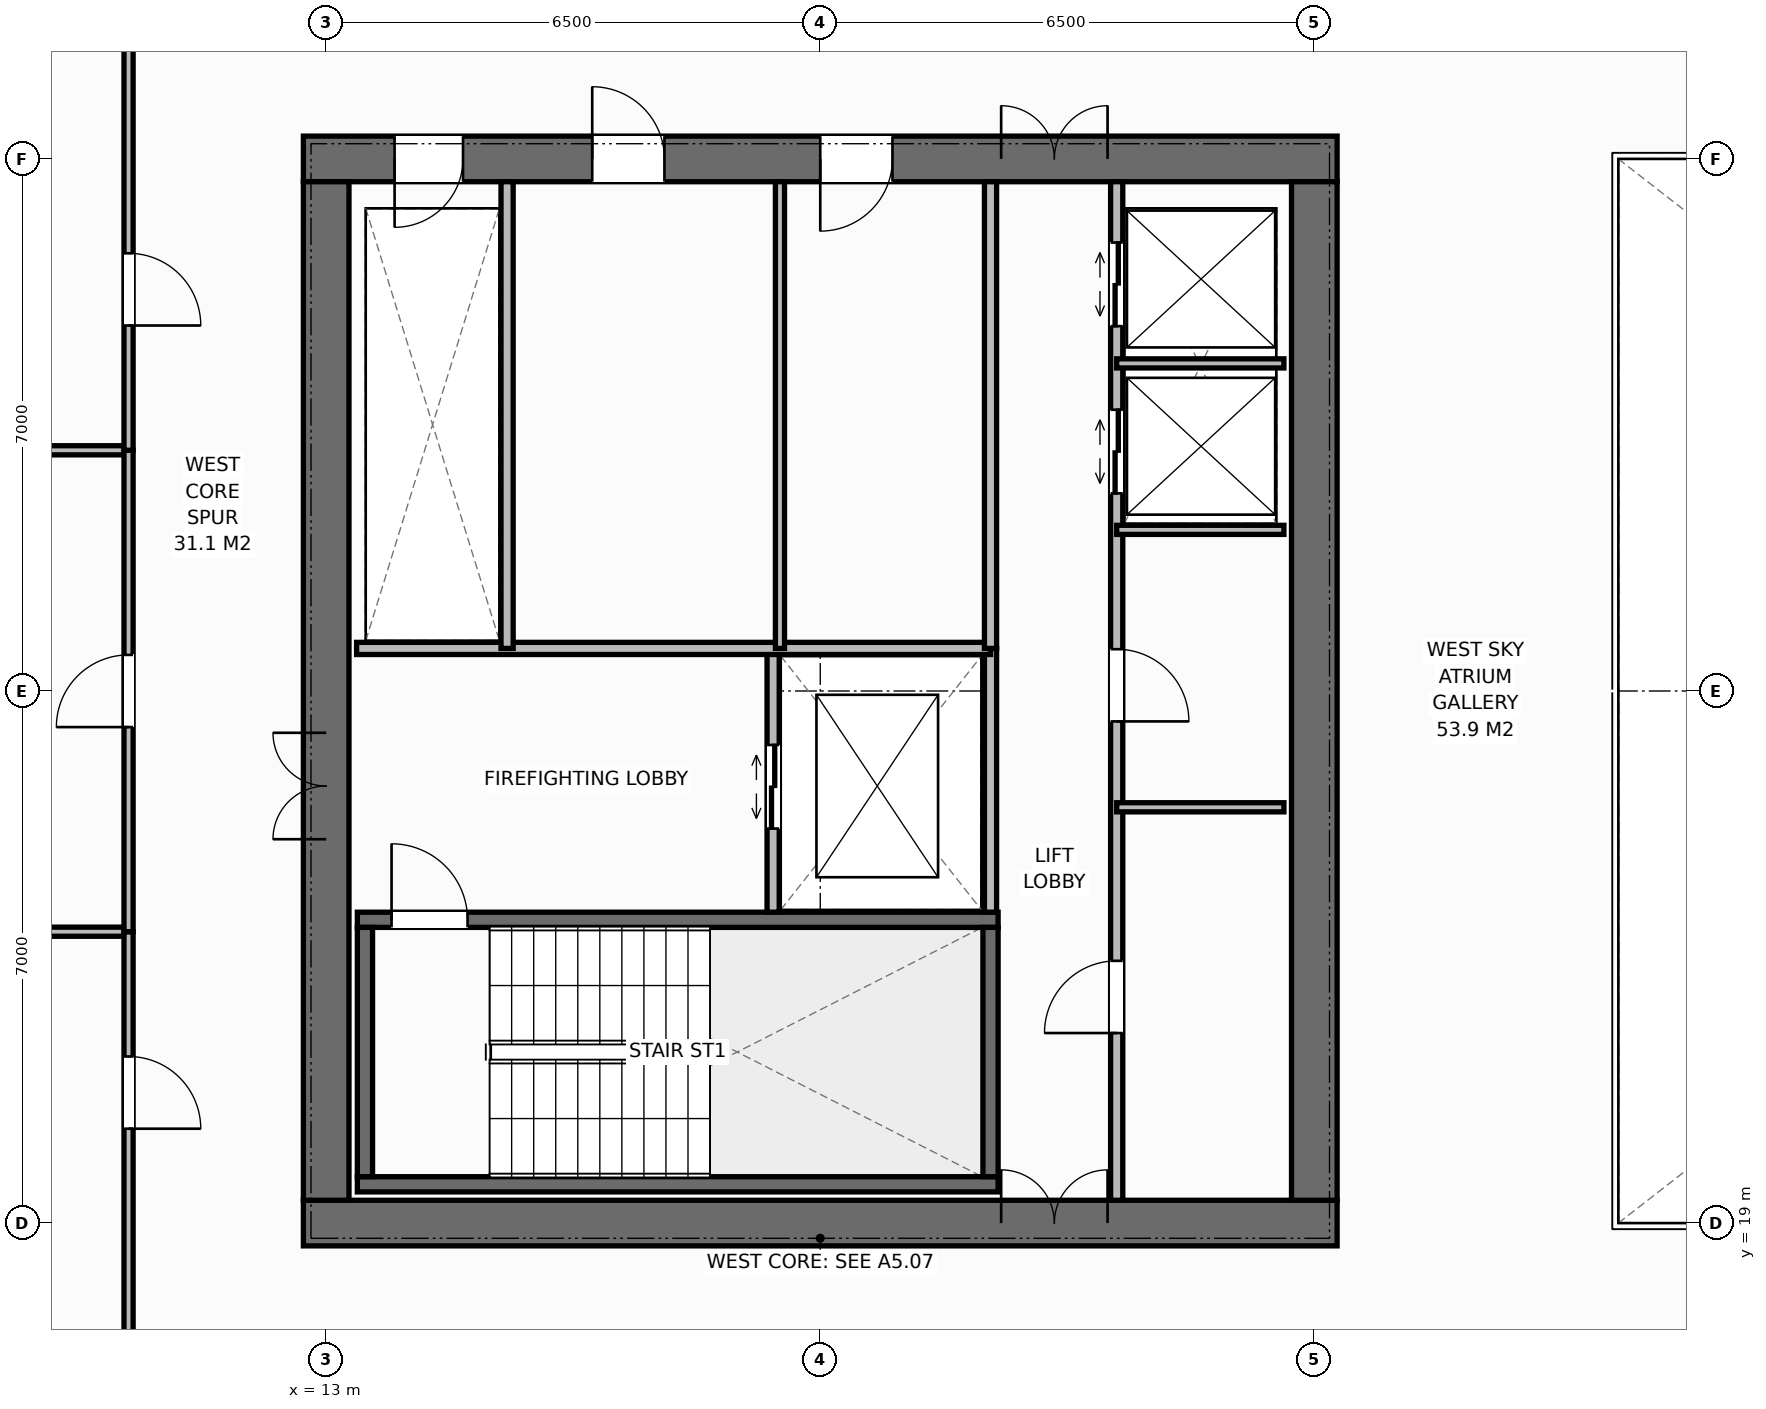
"""IFC4 building model, lengths in metres.
Left out: names, types, materials, properties, quantities, classifications, styles, units other than length and angle.
Written with IfcOpenShell. Run it as: python <this file> out.ifc"""

import sys

from ifc_helpers import new_model, si_unit, direction, frame, frame_2d, origin, place, context, subcontext, project, spatial, rectangle, extrude, element, fill, save


model = new_model("IFC4")
c1 = context("Model", 3, precision=1e-05, world=origin(), true_north=direction((0.0, 1.0)))
c2 = subcontext(c1, "Body", "Model", "MODEL_VIEW")
j1 = project(units=[si_unit("LENGTHUNIT", "METRE"), si_unit("PLANEANGLEUNIT", "RADIAN")], contexts=[c1])
p1 = place(None, origin())
s1 = spatial("IfcSite", under=j1, at=p1, CompositionType="ELEMENT")
p2 = place(p1, origin())
s2 = spatial("IfcBuilding", under=s1, at=p2, CompositionType="ELEMENT")
p3 = place(p2, frame((0.0, 0.0, 189.8)))
s3 = spatial("IfcBuildingStorey", under=s2, at=p3, CompositionType="ELEMENT", Elevation=189.8)
p4 = place(p3, frame((12.7, 19.0, 0.0), z_axis=(0.0, 0.0, 1.0), x_axis=(1.0, 0.0, 0.0)))
e1 = element("IfcWall", 1, at=p4, inside=s3, PredefinedType="SHEAR", context=c2, shape_type="SweptSolid", body=[
    extrude(rectangle(XDim=13.6, YDim=0.6, at=frame_2d((6.8, 0.0))), origin(), (0.0, 0.0, 1.0), 3.8),
])
p5 = place(p4, frame((9.18, 0.0, 0.0)))
e2 = element("IfcOpeningElement", 2, at=p5, cuts=e1, PredefinedType="OPENING", context=c2, shape_type="SweptSolid", body=[
    extrude(rectangle(XDim=1.4, YDim=2.2, at=frame_2d((0.7, 1.1))), frame((0.0, 0.31, 0.0), z_axis=(0.0, -1.0, 0.0), x_axis=(1.0, 0.0, 0.0)), (0.0, 0.0, 1.0), 0.62),
])
p6 = place(p3, frame((12.7, 33.0, 0.0), z_axis=(0.0, 0.0, 1.0), x_axis=(1.0, 0.0, 0.0)))
e3 = element("IfcWall", 3, at=p6, inside=s3, PredefinedType="SHEAR", context=c2, shape_type="SweptSolid", body=[
    extrude(rectangle(XDim=13.6, YDim=0.6, at=frame_2d((6.8, 0.0))), origin(), (0.0, 0.0, 1.0), 3.8),
])
p7 = place(p6, frame((1.2, 0.0, 0.0)))
e4 = element("IfcOpeningElement", 4, at=p7, cuts=e3, PredefinedType="OPENING", context=c2, shape_type="SweptSolid", body=[
    extrude(rectangle(XDim=0.9, YDim=2.15, at=frame_2d((0.45, 1.075))), frame((0.0, 0.31, 0.0), z_axis=(0.0, -1.0, 0.0), x_axis=(1.0, 0.0, 0.0)), (0.0, 0.0, 1.0), 0.62),
])
p8 = place(p6, frame((3.8, 0.0, 0.0)))
e5 = element("IfcOpeningElement", 5, at=p8, cuts=e3, PredefinedType="OPENING", context=c2, shape_type="SweptSolid", body=[
    extrude(rectangle(XDim=0.95, YDim=2.15, at=frame_2d((0.475, 1.075))), frame((0.0, 0.31, 0.0), z_axis=(0.0, -1.0, 0.0), x_axis=(1.0, 0.0, 0.0)), (0.0, 0.0, 1.0), 0.62),
])
p9 = place(p6, frame((6.8, 0.0, 0.0)))
e6 = element("IfcOpeningElement", 6, at=p9, cuts=e3, PredefinedType="OPENING", context=c2, shape_type="SweptSolid", body=[
    extrude(rectangle(XDim=0.95, YDim=2.15, at=frame_2d((0.475, 1.075))), frame((0.0, 0.31, 0.0), z_axis=(0.0, -1.0, 0.0), x_axis=(1.0, 0.0, 0.0)), (0.0, 0.0, 1.0), 0.62),
])
p10 = place(p6, frame((9.18, 0.0, 0.0)))
e7 = element("IfcOpeningElement", 7, at=p10, cuts=e3, PredefinedType="OPENING", context=c2, shape_type="SweptSolid", body=[
    extrude(rectangle(XDim=1.4, YDim=2.2, at=frame_2d((0.7, 1.1))), frame((0.0, 0.31, 0.0), z_axis=(0.0, -1.0, 0.0), x_axis=(1.0, 0.0, 0.0)), (0.0, 0.0, 1.0), 0.62),
])
p11 = place(p3, frame((13.0, 19.3, 0.0), z_axis=(0.0, 0.0, 1.0), x_axis=(0.0, 1.0, 0.0)))
e8 = element("IfcWall", 8, at=p11, inside=s3, PredefinedType="SHEAR", context=c2, shape_type="SweptSolid", body=[
    extrude(rectangle(XDim=13.4, YDim=0.6, at=frame_2d((6.7, 0.0))), origin(), (0.0, 0.0, 1.0), 3.8),
])
p12 = place(p11, frame((4.75, 0.0, 0.0)))
e9 = element("IfcOpeningElement", 9, at=p12, cuts=e8, PredefinedType="OPENING", context=c2, shape_type="SweptSolid", body=[
    extrude(rectangle(XDim=1.4, YDim=2.2, at=frame_2d((0.7, 1.1))), frame((0.0, 0.31, 0.0), z_axis=(0.0, -1.0, 0.0), x_axis=(1.0, 0.0, 0.0)), (0.0, 0.0, 1.0), 0.62),
])
p13 = place(p3, frame((26.0, 19.3, 0.0), z_axis=(0.0, 0.0, 1.0), x_axis=(0.0, 1.0, 0.0)))
e10 = element("IfcWall", 10, at=p13, inside=s3, PredefinedType="SHEAR", context=c2, shape_type="SweptSolid", body=[
    extrude(rectangle(XDim=13.4, YDim=0.6, at=frame_2d((6.7, 0.0))), origin(), (0.0, 0.0, 1.0), 3.8),
])
p14 = place(p3, frame((13.41, 19.51, 0.0), z_axis=(0.0, 0.0, 1.0), x_axis=(1.0, 0.0, 0.0)))
e11 = element("IfcWall", 11, at=p14, inside=s3, PredefinedType="SHEAR", context=c2, shape_type="SweptSolid", body=[
    extrude(rectangle(XDim=8.43, YDim=0.2, at=frame_2d((4.215, 0.0))), origin(), (0.0, 0.0, 1.0), 3.8),
])
p15 = place(p3, frame((13.41, 22.99, 0.0), z_axis=(0.0, 0.0, 1.0), x_axis=(1.0, 0.0, 0.0)))
e12 = element("IfcWall", 12, at=p15, inside=s3, PredefinedType="SHEAR", context=c2, shape_type="SweptSolid", body=[
    extrude(rectangle(XDim=8.43, YDim=0.2, at=frame_2d((4.215, 0.0))), origin(), (0.0, 0.0, 1.0), 3.8),
])
p16 = place(p15, frame((0.45, 0.0, 0.0)))
e13 = element("IfcOpeningElement", 13, at=p16, cuts=e12, PredefinedType="OPENING", context=c2, shape_type="SweptSolid", body=[
    extrude(rectangle(XDim=1.0, YDim=2.15, at=frame_2d((0.5, 1.075))), frame((0.0, 0.11, 0.0), z_axis=(0.0, -1.0, 0.0), x_axis=(1.0, 0.0, 0.0)), (0.0, 0.0, 1.0), 0.22),
])
for number, where, z_axis, x_axis in (
    (14, (13.51, 19.61, 0.0), (0.0, 0.0, 1.0), (0.0, 1.0, 0.0)),
    (15, (21.74, 19.61, 0.0), (0.0, 0.0, 1.0), (0.0, 1.0, 0.0)),
):
    element("IfcWall", number, at=place(p3, frame(where, z_axis=z_axis, x_axis=x_axis)), inside=s3, PredefinedType="SHEAR", context=c2, shape_type="SweptSolid", body=[
        extrude(rectangle(XDim=3.28, YDim=0.2, at=frame_2d((1.64, 0.0))), origin(), (0.0, 0.0, 1.0), 3.8),
    ])
p17 = place(p3, frame((21.74, 23.09, 0.0), z_axis=(0.0, 0.0, 1.0), x_axis=(0.0, 1.0, 0.0)))
e16 = element("IfcWall", 16, at=p17, inside=s3, PredefinedType="STANDARD", context=c2, shape_type="SweptSolid", body=[
    extrude(rectangle(XDim=3.47, YDim=0.16, at=frame_2d((1.735, 0.0))), origin(), (0.0, 0.0, 1.0), 3.572),
])
p18 = place(p3, frame((18.88, 23.09, 0.0), z_axis=(0.0, 0.0, 1.0), x_axis=(0.0, 1.0, 0.0)))
e17 = element("IfcWall", 17, at=p18, inside=s3, PredefinedType="STANDARD", context=c2, shape_type="SweptSolid", body=[
    extrude(rectangle(XDim=3.47, YDim=0.16, at=frame_2d((1.735, 0.0))), origin(), (0.0, 0.0, 1.0), 3.572),
])
p19 = place(p18, frame((1.1, 0.0, 0.0)))
e18 = element("IfcOpeningElement", 18, at=p19, cuts=e17, PredefinedType="OPENING", context=c2, shape_type="SweptSolid", body=[
    extrude(rectangle(XDim=1.1, YDim=2.2, at=frame_2d((0.55, 1.1))), frame((0.0, 0.09, 0.0), z_axis=(0.0, -1.0, 0.0), x_axis=(1.0, 0.0, 0.0)), (0.0, 0.0, 1.0), 0.18),
])
p20 = place(p3, frame((13.4, 26.56, 0.0), z_axis=(0.0, 0.0, 1.0), x_axis=(1.0, 0.0, 0.0)))
e19 = element("IfcWall", 19, at=p20, inside=s3, PredefinedType="STANDARD", context=c2, shape_type="SweptSolid", body=[
    extrude(rectangle(XDim=8.34, YDim=0.16, at=frame_2d((4.17, 0.0))), origin(), (0.0, 0.0, 1.0), 3.572),
])
p21 = place(p3, frame((15.38, 26.56, 0.0), z_axis=(0.0, 0.0, 1.0), x_axis=(0.0, 1.0, 0.0)))
e20 = element("IfcWall", 20, at=p21, inside=s3, PredefinedType="STANDARD", context=c2, shape_type="SweptSolid", body=[
    extrude(rectangle(XDim=6.14, YDim=0.16, at=frame_2d((3.07, 0.0))), origin(), (0.0, 0.0, 1.0), 3.572),
])
p22 = place(p3, frame((18.97, 26.56, 0.0), z_axis=(0.0, 0.0, 1.0), x_axis=(0.0, 1.0, 0.0)))
e21 = element("IfcWall", 21, at=p22, inside=s3, PredefinedType="PARTITIONING", context=c2, shape_type="SweptSolid", body=[
    extrude(rectangle(XDim=6.14, YDim=0.12, at=frame_2d((3.07, 0.0))), origin(), (0.0, 0.0, 1.0), 3.572),
])
p23 = place(p3, frame((21.74, 26.56, 0.0), z_axis=(0.0, 0.0, 1.0), x_axis=(0.0, 1.0, 0.0)))
e22 = element("IfcWall", 22, at=p23, inside=s3, PredefinedType="STANDARD", context=c2, shape_type="SweptSolid", body=[
    extrude(rectangle(XDim=6.14, YDim=0.16, at=frame_2d((3.07, 0.0))), origin(), (0.0, 0.0, 1.0), 3.572),
])
p24 = place(p3, frame((23.4, 19.3, 0.0), z_axis=(0.0, 0.0, 1.0), x_axis=(0.0, 1.0, 0.0)))
e23 = element("IfcWall", 23, at=p24, inside=s3, PredefinedType="STANDARD", context=c2, shape_type="SweptSolid", body=[
    extrude(rectangle(XDim=13.4, YDim=0.16, at=frame_2d((6.7, 0.0))), origin(), (0.0, 0.0, 1.0), 3.572),
])
p25 = place(p24, frame((2.2, 0.0, 0.0)))
e24 = element("IfcOpeningElement", 24, at=p25, cuts=e23, PredefinedType="OPENING", context=c2, shape_type="SweptSolid", body=[
    extrude(rectangle(XDim=0.95, YDim=2.15, at=frame_2d((0.475, 1.075))), frame((0.0, 0.09, 0.0), z_axis=(0.0, -1.0, 0.0), x_axis=(1.0, 0.0, 0.0)), (0.0, 0.0, 1.0), 0.18),
])
p26 = place(p24, frame((6.3, 0.0, 0.0)))
e25 = element("IfcOpeningElement", 25, at=p26, cuts=e23, PredefinedType="OPENING", context=c2, shape_type="SweptSolid", body=[
    extrude(rectangle(XDim=0.95, YDim=2.15, at=frame_2d((0.475, 1.075))), frame((0.0, 0.09, 0.0), z_axis=(0.0, -1.0, 0.0), x_axis=(1.0, 0.0, 0.0)), (0.0, 0.0, 1.0), 0.18),
])
p27 = place(p24, frame((9.3, 0.0, 0.0)))
e26 = element("IfcOpeningElement", 26, at=p27, cuts=e23, PredefinedType="OPENING", context=c2, shape_type="SweptSolid", body=[
    extrude(rectangle(XDim=1.1, YDim=2.2, at=frame_2d((0.55, 1.1))), frame((0.0, 0.09, 0.0), z_axis=(0.0, -1.0, 0.0), x_axis=(1.0, 0.0, 0.0)), (0.0, 0.0, 1.0), 0.18),
])
p28 = place(p24, frame((11.5, 0.0, 0.0)))
e27 = element("IfcOpeningElement", 27, at=p28, cuts=e23, PredefinedType="OPENING", context=c2, shape_type="SweptSolid", body=[
    extrude(rectangle(XDim=1.1, YDim=2.2, at=frame_2d((0.55, 1.1))), frame((0.0, 0.09, 0.0), z_axis=(0.0, -1.0, 0.0), x_axis=(1.0, 0.0, 0.0)), (0.0, 0.0, 1.0), 0.18),
])
for number, where, z_axis, x_axis in (
    (28, (23.4, 24.47, 0.0), (0.0, 0.0, 1.0), (1.0, 0.0, 0.0)),
    (29, (23.4, 28.12, 0.0), (0.0, 0.0, 1.0), (1.0, 0.0, 0.0)),
    (30, (23.4, 30.31, 0.0), (0.0, 0.0, 1.0), (1.0, 0.0, 0.0)),
):
    element("IfcWall", number, at=place(p3, frame(where, z_axis=z_axis, x_axis=x_axis)), inside=s3, PredefinedType="PARTITIONING", context=c2, shape_type="SweptSolid", body=[
        extrude(rectangle(XDim=2.2, YDim=0.12, at=frame_2d((1.1, 0.0))), origin(), (0.0, 0.0, 1.0), 3.572),
    ])
p29 = place(p3, frame((3.82, 22.833, 0.0), z_axis=(0.0, 0.0, 1.0), x_axis=(1.0, 0.0, 0.0)))
e31 = element("IfcWall", 31, at=p29, inside=s3, PredefinedType="PARTITIONING", context=c2, shape_type="SweptSolid", body=[
    extrude(rectangle(XDim=6.58, YDim=0.12, at=frame_2d((3.29, 0.0))), origin(), (0.0, 0.0, 1.0), 3.572),
])
p30 = place(p3, frame((10.4, 16.5, 0.0), z_axis=(0.0, 0.0, 1.0), x_axis=(0.0, 1.0, 0.0)))
e32 = element("IfcWall", 32, at=p30, inside=s3, PredefinedType="PARTITIONING", context=c2, shape_type="SweptSolid", body=[
    extrude(rectangle(XDim=6.333, YDim=0.12, at=frame_2d((3.167, 0.0))), origin(), (0.0, 0.0, 1.0), 3.572),
])
p31 = place(p30, frame((3.742, 0.0, 0.0)))
e33 = element("IfcOpeningElement", 33, at=p31, cuts=e32, PredefinedType="OPENING", context=c2, shape_type="SweptSolid", body=[
    extrude(rectangle(XDim=0.95, YDim=2.15, at=frame_2d((0.475, 1.075))), frame((0.0, 0.07, 0.0), z_axis=(0.0, -1.0, 0.0), x_axis=(1.0, 0.0, 0.0)), (0.0, 0.0, 1.0), 0.14),
])
p32 = place(p3, frame((3.82, 29.167, 0.0), z_axis=(0.0, 0.0, 1.0), x_axis=(1.0, 0.0, 0.0)))
e34 = element("IfcWall", 34, at=p32, inside=s3, PredefinedType="PARTITIONING", context=c2, shape_type="SweptSolid", body=[
    extrude(rectangle(XDim=6.58, YDim=0.12, at=frame_2d((3.29, 0.0))), origin(), (0.0, 0.0, 1.0), 3.572),
])
p33 = place(p3, frame((10.4, 22.833, 0.0), z_axis=(0.0, 0.0, 1.0), x_axis=(0.0, 1.0, 0.0)))
e35 = element("IfcWall", 35, at=p33, inside=s3, PredefinedType="PARTITIONING", context=c2, shape_type="SweptSolid", body=[
    extrude(rectangle(XDim=6.333, YDim=0.12, at=frame_2d((3.167, 0.0))), origin(), (0.0, 0.0, 1.0), 3.572),
])
p34 = place(p33, frame((2.692, 0.0, 0.0)))
e36 = element("IfcOpeningElement", 36, at=p34, cuts=e35, PredefinedType="OPENING", context=c2, shape_type="SweptSolid", body=[
    extrude(rectangle(XDim=0.95, YDim=2.15, at=frame_2d((0.475, 1.075))), frame((0.0, 0.07, 0.0), z_axis=(0.0, -1.0, 0.0), x_axis=(1.0, 0.0, 0.0)), (0.0, 0.0, 1.0), 0.14),
])
p35 = place(p3, frame((10.4, 29.167, 0.0), z_axis=(0.0, 0.0, 1.0), x_axis=(0.0, 1.0, 0.0)))
e37 = element("IfcWall", 37, at=p35, inside=s3, PredefinedType="PARTITIONING", context=c2, shape_type="SweptSolid", body=[
    extrude(rectangle(XDim=6.333, YDim=0.12, at=frame_2d((3.167, 0.0))), origin(), (0.0, 0.0, 1.0), 3.572),
])
p36 = place(p35, frame((1.642, 0.0, 0.0)))
e38 = element("IfcOpeningElement", 38, at=p36, cuts=e37, PredefinedType="OPENING", context=c2, shape_type="SweptSolid", body=[
    extrude(rectangle(XDim=0.95, YDim=2.15, at=frame_2d((0.475, 1.075))), frame((0.0, 0.07, 0.0), z_axis=(0.0, -1.0, 0.0), x_axis=(1.0, 0.0, 0.0)), (0.0, 0.0, 1.0), 0.14),
])
p37 = place(p16, origin())
e39 = element("IfcDoor", 39, at=p37, inside=s3, OperationType="SINGLE_SWING_LEFT", PredefinedType="DOOR", context=c2, shape_type="SweptSolid", body=[
    extrude(rectangle(XDim=1.0, YDim=2.15, at=frame_2d((0.5, 1.075))), frame((0.0, 0.025, 0.0), z_axis=(0.0, -1.0, 0.0), x_axis=(1.0, 0.0, 0.0)), (0.0, 0.0, 1.0), 0.05),
])
fill(e13, e39)
p38 = place(p12, origin())
e40 = element("IfcDoor", 40, at=p38, inside=s3, OperationType="DOUBLE_DOOR_SINGLE_SWING", PredefinedType="DOOR", context=c2, shape_type="SweptSolid", body=[
    extrude(rectangle(XDim=1.4, YDim=2.2, at=frame_2d((0.7, 1.1))), frame((0.0, 0.025, 0.0), z_axis=(0.0, -1.0, 0.0), x_axis=(1.0, 0.0, 0.0)), (0.0, 0.0, 1.0), 0.05),
])
fill(e9, e40)
p39 = place(p19, origin())
e41 = element("IfcDoor", 41, at=p39, inside=s3, OperationType="DOUBLE_DOOR_SLIDING", PredefinedType="DOOR", context=c2, shape_type="SweptSolid", body=[
    extrude(rectangle(XDim=1.1, YDim=2.2, at=frame_2d((0.55, 1.1))), frame((0.0, 0.025, 0.0), z_axis=(0.0, -1.0, 0.0), x_axis=(1.0, 0.0, 0.0)), (0.0, 0.0, 1.0), 0.05),
])
fill(e18, e41)
p40 = place(p7, origin())
e42 = element("IfcDoor", 42, at=p40, inside=s3, OperationType="SINGLE_SWING_RIGHT", PredefinedType="DOOR", context=c2, shape_type="SweptSolid", body=[
    extrude(rectangle(XDim=0.9, YDim=2.15, at=frame_2d((0.45, 1.075))), frame((0.0, -0.025, 0.0), z_axis=(0.0, -1.0, 0.0), x_axis=(1.0, 0.0, 0.0)), (0.0, 0.0, 1.0), 0.05),
])
fill(e4, e42)
p41 = place(p8, origin())
e43 = element("IfcDoor", 43, at=p41, inside=s3, OperationType="SINGLE_SWING_LEFT", PredefinedType="DOOR", context=c2, shape_type="SweptSolid", body=[
    extrude(rectangle(XDim=0.95, YDim=2.15, at=frame_2d((0.475, 1.075))), frame((0.0, -0.025, 0.0), z_axis=(0.0, -1.0, 0.0), x_axis=(1.0, 0.0, 0.0)), (0.0, 0.0, 1.0), 0.05),
])
fill(e5, e43)
p42 = place(p9, origin())
e44 = element("IfcDoor", 44, at=p42, inside=s3, OperationType="SINGLE_SWING_RIGHT", PredefinedType="DOOR", context=c2, shape_type="SweptSolid", body=[
    extrude(rectangle(XDim=0.95, YDim=2.15, at=frame_2d((0.475, 1.075))), frame((0.0, -0.025, 0.0), z_axis=(0.0, -1.0, 0.0), x_axis=(1.0, 0.0, 0.0)), (0.0, 0.0, 1.0), 0.05),
])
fill(e6, e44)
p43 = place(p5, origin())
e45 = element("IfcDoor", 45, at=p43, inside=s3, OperationType="DOUBLE_DOOR_SINGLE_SWING", PredefinedType="DOOR", context=c2, shape_type="SweptSolid", body=[
    extrude(rectangle(XDim=1.4, YDim=2.2, at=frame_2d((0.7, 1.1))), frame((0.0, 0.075, 0.0), z_axis=(0.0, -1.0, 0.0), x_axis=(1.0, 0.0, 0.0)), (0.0, 0.0, 1.0), 0.05),
])
fill(e2, e45)
p44 = place(p10, origin())
e46 = element("IfcDoor", 46, at=p44, inside=s3, OperationType="DOUBLE_DOOR_SINGLE_SWING", PredefinedType="DOOR", context=c2, shape_type="SweptSolid", body=[
    extrude(rectangle(XDim=1.4, YDim=2.2, at=frame_2d((0.7, 1.1))), frame((0.0, -0.025, 0.0), z_axis=(0.0, -1.0, 0.0), x_axis=(1.0, 0.0, 0.0)), (0.0, 0.0, 1.0), 0.05),
])
fill(e7, e46)
p45 = place(p25, origin())
e47 = element("IfcDoor", 47, at=p45, inside=s3, OperationType="SINGLE_SWING_LEFT", PredefinedType="DOOR", context=c2, shape_type="SweptSolid", body=[
    extrude(rectangle(XDim=0.95, YDim=2.15, at=frame_2d((0.475, 1.075))), frame((0.0, 0.025, 0.0), z_axis=(0.0, -1.0, 0.0), x_axis=(1.0, 0.0, 0.0)), (0.0, 0.0, 1.0), 0.05),
])
fill(e24, e47)
p46 = place(p26, origin())
e48 = element("IfcDoor", 48, at=p46, inside=s3, OperationType="SINGLE_SWING_RIGHT", PredefinedType="DOOR", context=c2, shape_type="SweptSolid", body=[
    extrude(rectangle(XDim=0.95, YDim=2.15, at=frame_2d((0.475, 1.075))), frame((0.0, 0.025, 0.0), z_axis=(0.0, -1.0, 0.0), x_axis=(1.0, 0.0, 0.0)), (0.0, 0.0, 1.0), 0.05),
])
fill(e25, e48)
p47 = place(p27, origin())
e49 = element("IfcDoor", 49, at=p47, inside=s3, OperationType="DOUBLE_DOOR_SLIDING", PredefinedType="DOOR", context=c2, shape_type="SweptSolid", body=[
    extrude(rectangle(XDim=1.1, YDim=2.2, at=frame_2d((0.55, 1.1))), frame((0.0, 0.025, 0.0), z_axis=(0.0, -1.0, 0.0), x_axis=(1.0, 0.0, 0.0)), (0.0, 0.0, 1.0), 0.05),
])
fill(e26, e49)
p48 = place(p28, origin())
e50 = element("IfcDoor", 50, at=p48, inside=s3, OperationType="DOUBLE_DOOR_SLIDING", PredefinedType="DOOR", context=c2, shape_type="SweptSolid", body=[
    extrude(rectangle(XDim=1.1, YDim=2.2, at=frame_2d((0.55, 1.1))), frame((0.0, 0.025, 0.0), z_axis=(0.0, -1.0, 0.0), x_axis=(1.0, 0.0, 0.0)), (0.0, 0.0, 1.0), 0.05),
])
fill(e27, e50)
p49 = place(p31, origin())
e51 = element("IfcDoor", 51, at=p49, inside=s3, OperationType="SINGLE_SWING_RIGHT", PredefinedType="DOOR", context=c2, shape_type="SweptSolid", body=[
    extrude(rectangle(XDim=0.95, YDim=2.15, at=frame_2d((0.475, 1.075))), frame((0.0, 0.025, 0.0), z_axis=(0.0, -1.0, 0.0), x_axis=(1.0, 0.0, 0.0)), (0.0, 0.0, 1.0), 0.05),
])
fill(e33, e51)
p50 = place(p34, origin())
e52 = element("IfcDoor", 52, at=p50, inside=s3, OperationType="SINGLE_SWING_LEFT", PredefinedType="DOOR", context=c2, shape_type="SweptSolid", body=[
    extrude(rectangle(XDim=0.95, YDim=2.15, at=frame_2d((0.475, 1.075))), frame((0.0, 0.025, 0.0), z_axis=(0.0, -1.0, 0.0), x_axis=(1.0, 0.0, 0.0)), (0.0, 0.0, 1.0), 0.05),
])
fill(e36, e52)
p51 = place(p36, origin())
e53 = element("IfcDoor", 53, at=p51, inside=s3, OperationType="SINGLE_SWING_RIGHT", PredefinedType="DOOR", context=c2, shape_type="SweptSolid", body=[
    extrude(rectangle(XDim=0.95, YDim=2.15, at=frame_2d((0.475, 1.075))), frame((0.0, 0.025, 0.0), z_axis=(0.0, -1.0, 0.0), x_axis=(1.0, 0.0, 0.0)), (0.0, 0.0, 1.0), 0.05),
])
fill(e38, e53)
save(model, sys.argv[1])
